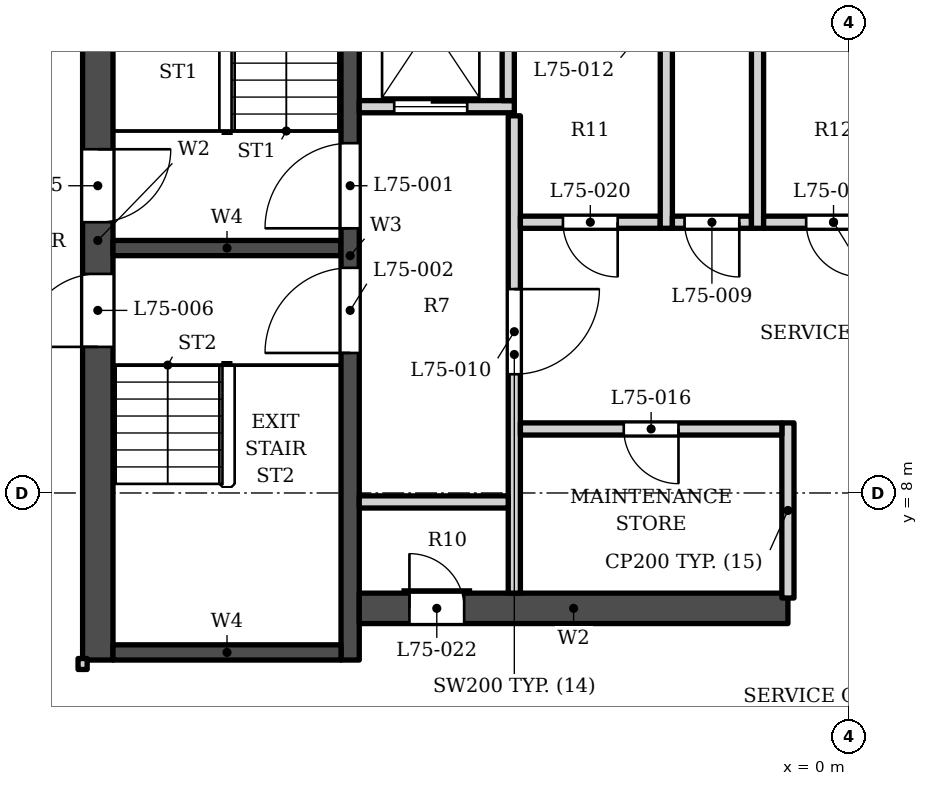
"""IFC4 building model, lengths in metres.
Left out: names, types, materials, properties, quantities, classifications, styles, units other than length and angle.
Written with IfcOpenShell. Run it as: python <this file> out.ifc"""

import sys

from ifc_helpers import new_model, si_unit, direction, frame, frame_2d, origin, place, context, subcontext, project, spatial, rectangle, extrude, element, fill, save


model = new_model("IFC4")
c1 = context("Model", 3, precision=1e-05, world=origin(), true_north=direction((0.0, 1.0)))
c2 = subcontext(c1, "Body", "Model", "MODEL_VIEW")
j1 = project(units=[si_unit("LENGTHUNIT", "METRE"), si_unit("PLANEANGLEUNIT", "RADIAN")], contexts=[c1])
p1 = place(None, origin())
s1 = spatial("IfcSite", under=j1, at=p1, CompositionType="ELEMENT")
p2 = place(p1, origin())
s2 = spatial("IfcBuilding", under=s1, at=p2, CompositionType="ELEMENT")
p3 = place(p2, frame((0.0, 0.0, 320.5)))
s3 = spatial("IfcBuildingStorey", under=s2, at=p3, CompositionType="ELEMENT", Elevation=320.5)
p4 = place(p3, frame((-12.35, 5.253, 0.0), z_axis=(0.0, 0.0, 1.0), x_axis=(0.0, 1.0, 0.0)))
e1 = element("IfcWall", 1, at=p4, inside=s3, PredefinedType="SHEAR", context=c2, shape_type="SweptSolid", body=[
    extrude(rectangle(XDim=13.8, YDim=0.5, at=frame_2d((6.9, 0.0))), origin(), (0.0, 0.0, 1.0), 5.0),
])
p5 = place(p4, frame((7.2, 0.0, 0.0)))
e2 = element("IfcOpeningElement", 2, at=p5, cuts=e1, PredefinedType="OPENING", context=c2, shape_type="SweptSolid", body=[
    extrude(rectangle(XDim=1.2, YDim=2.1, at=frame_2d((0.6, 1.05))), frame((0.0, 0.26, 0.0), z_axis=(0.0, -1.0, 0.0), x_axis=(1.0, 0.0, 0.0)), (0.0, 0.0, 1.0), 0.52),
])
p6 = place(p4, frame((5.15, 0.0, 0.0)))
e3 = element("IfcOpeningElement", 3, at=p6, cuts=e1, PredefinedType="OPENING", context=c2, shape_type="SweptSolid", body=[
    extrude(rectangle(XDim=1.2, YDim=2.1, at=frame_2d((0.6, 1.05))), frame((0.0, 0.26, 0.0), z_axis=(0.0, -1.0, 0.0), x_axis=(1.0, 0.0, 0.0)), (0.0, 0.0, 1.0), 0.52),
])
p7 = place(p3, frame((-8.2, 5.253, 0.0), z_axis=(0.0, 0.0, 1.0), x_axis=(0.0, 1.0, 0.0)))
e4 = element("IfcWall", 4, at=p7, inside=s3, PredefinedType="SHEAR", context=c2, shape_type="SweptSolid", body=[
    extrude(rectangle(XDim=13.3, YDim=0.3, at=frame_2d((6.65, 0.0))), origin(), (0.0, 0.0, 1.0), 5.0),
])
p8 = place(p7, frame((7.1, 0.0, 0.0)))
e5 = element("IfcOpeningElement", 5, at=p8, cuts=e4, PredefinedType="OPENING", context=c2, shape_type="SweptSolid", body=[
    extrude(rectangle(XDim=1.4, YDim=2.1, at=frame_2d((0.7, 1.05))), frame((0.0, 0.16, 0.0), z_axis=(0.0, -1.0, 0.0), x_axis=(1.0, 0.0, 0.0)), (0.0, 0.0, 1.0), 0.32),
])
p9 = place(p7, frame((5.05, 0.0, 0.0)))
e6 = element("IfcOpeningElement", 6, at=p9, cuts=e4, PredefinedType="OPENING", context=c2, shape_type="SweptSolid", body=[
    extrude(rectangle(XDim=1.4, YDim=2.1, at=frame_2d((0.7, 1.05))), frame((0.0, 0.16, 0.0), z_axis=(0.0, -1.0, 0.0), x_axis=(1.0, 0.0, 0.0)), (0.0, 0.0, 1.0), 0.32),
])
for number, where, z_axis, x_axis in (
    (7, (-12.1, 12.028, 0.0), (0.0, 0.0, 1.0), (1.0, 0.0, 0.0)),
    (8, (-12.1, 5.378, 0.0), (0.0, 0.0, 1.0), (1.0, 0.0, 0.0)),
):
    element("IfcWall", number, at=place(p3, frame(where, z_axis=z_axis, x_axis=x_axis)), inside=s3, PredefinedType="SHEAR", context=c2, shape_type="SweptSolid", body=[
        extrude(rectangle(XDim=3.75, YDim=0.25, at=frame_2d((1.875, 0.0))), origin(), (0.0, 0.0, 1.0), 5.0),
    ])
p10 = place(p3, frame((-8.05, 6.103, 0.0), z_axis=(0.0, 0.0, 1.0), x_axis=(1.0, 0.0, 0.0)))
e9 = element("IfcWall", 9, at=p10, inside=s3, PredefinedType="SHEAR", context=c2, shape_type="SweptSolid", body=[
    extrude(rectangle(XDim=7.05, YDim=0.5, at=frame_2d((3.525, 0.0))), origin(), (0.0, 0.0, 1.0), 5.0),
])
p11 = place(p10, frame((0.825, 0.0, 0.0)))
e10 = element("IfcOpeningElement", 10, at=p11, cuts=e9, PredefinedType="OPENING", context=c2, shape_type="SweptSolid", body=[
    extrude(rectangle(XDim=0.9, YDim=2.1, at=frame_2d((0.45, 1.05))), frame((0.0, 0.26, 0.0), z_axis=(0.0, -1.0, 0.0), x_axis=(1.0, 0.0, 0.0)), (0.0, 0.0, 1.0), 0.52),
])
p12 = place(p3, frame((-1.0, 6.273, 0.0), z_axis=(0.0, 0.0, 1.0), x_axis=(0.0, 1.0, 0.0)))
e11 = element("IfcWall", 11, at=p12, inside=s3, PredefinedType="PARTITIONING", context=c2, shape_type="SweptSolid", body=[
    extrude(rectangle(XDim=2.88, YDim=0.2, at=frame_2d((1.44, 0.0))), origin(), (0.0, 0.0, 1.0), 4.8),
])
p13 = place(p3, frame((-5.5, 6.353, 0.0), z_axis=(0.0, 0.0, 1.0), x_axis=(0.0, 1.0, 0.0)))
e12 = element("IfcWall", 12, at=p13, inside=s3, PredefinedType="SOLIDWALL", context=c2, shape_type="SweptSolid", body=[
    extrude(rectangle(XDim=7.85, YDim=0.2, at=frame_2d((3.925, 0.0))), origin(), (0.0, 0.0, 1.0), 4.8),
])
p14 = place(p13, frame((3.6, 0.0, 0.0)))
e13 = element("IfcOpeningElement", 13, at=p14, cuts=e12, PredefinedType="OPENING", context=c2, shape_type="SweptSolid", body=[
    extrude(rectangle(XDim=1.4, YDim=2.1, at=frame_2d((0.7, 1.05))), frame((0.0, 0.11, 0.0), z_axis=(0.0, -1.0, 0.0), x_axis=(1.0, 0.0, 0.0)), (0.0, 0.0, 1.0), 0.22),
])
p15 = place(p3, frame((-8.05, 7.853, 0.0), z_axis=(0.0, 0.0, 1.0), x_axis=(1.0, 0.0, 0.0)))
e14 = element("IfcWall", 14, at=p15, inside=s3, PredefinedType="SOLIDWALL", context=c2, shape_type="SweptSolid", body=[
    extrude(rectangle(XDim=2.45, YDim=0.2, at=frame_2d((1.225, 0.0))), origin(), (0.0, 0.0, 1.0), 4.8),
])
p16 = place(p3, frame((-5.4, 9.052, 0.0), z_axis=(0.0, 0.0, 1.0), x_axis=(1.0, 0.0, 0.0)))
e15 = element("IfcWall", 15, at=p16, inside=s3, PredefinedType="PARTITIONING", context=c2, shape_type="SweptSolid", body=[
    extrude(rectangle(XDim=4.3, YDim=0.2, at=frame_2d((2.15, 0.0))), origin(), (0.0, 0.0, 1.0), 4.8),
])
p17 = place(p16, frame((1.7, 0.0, 0.0)))
e16 = element("IfcOpeningElement", 16, at=p17, cuts=e15, PredefinedType="OPENING", context=c2, shape_type="SweptSolid", body=[
    extrude(rectangle(XDim=0.9, YDim=2.1, at=frame_2d((0.45, 1.05))), frame((0.0, 0.11, 0.0), z_axis=(0.0, -1.0, 0.0), x_axis=(1.0, 0.0, 0.0)), (0.0, 0.0, 1.0), 0.22),
])
p18 = place(p3, frame((-5.4, 12.453, 0.0), z_axis=(0.0, 0.0, 1.0), x_axis=(1.0, 0.0, 0.0)))
e17 = element("IfcWall", 17, at=p18, inside=s3, PredefinedType="PARTITIONING", context=c2, shape_type="SweptSolid", body=[
    extrude(rectangle(XDim=2.3, YDim=0.2, at=frame_2d((1.15, 0.0))), origin(), (0.0, 0.0, 1.0), 4.8),
])
p19 = place(p18, frame((0.7, 0.0, 0.0)))
e18 = element("IfcOpeningElement", 18, at=p19, cuts=e17, PredefinedType="OPENING", context=c2, shape_type="SweptSolid", body=[
    extrude(rectangle(XDim=0.9, YDim=2.1, at=frame_2d((0.45, 1.05))), frame((0.0, 0.11, 0.0), z_axis=(0.0, -1.0, 0.0), x_axis=(1.0, 0.0, 0.0)), (0.0, 0.0, 1.0), 0.22),
])
p20 = place(p3, frame((-3.0, 12.353, 0.0), z_axis=(0.0, 0.0, 1.0), x_axis=(0.0, 1.0, 0.0)))
e19 = element("IfcWall", 19, at=p20, inside=s3, PredefinedType="PARTITIONING", context=c2, shape_type="SweptSolid", body=[
    extrude(rectangle(XDim=6.2, YDim=0.2, at=frame_2d((3.1, 0.0))), origin(), (0.0, 0.0, 1.0), 4.8),
])
p21 = place(p20, frame((3.27, 0.0, 0.0)))
e20 = element("IfcOpeningElement", 20, at=p21, cuts=e19, PredefinedType="OPENING", context=c2, shape_type="SweptSolid", body=[
    extrude(rectangle(XDim=0.9, YDim=2.1, at=frame_2d((0.45, 1.05))), frame((0.0, 0.11, 0.0), z_axis=(0.0, -1.0, 0.0), x_axis=(1.0, 0.0, 0.0)), (0.0, 0.0, 1.0), 0.22),
])
p22 = place(p20, frame((4.82, 0.0, 0.0)))
e21 = element("IfcOpeningElement", 21, at=p22, cuts=e19, PredefinedType="OPENING", context=c2, shape_type="SweptSolid", body=[
    extrude(rectangle(XDim=0.9, YDim=2.1, at=frame_2d((0.45, 1.05))), frame((0.0, 0.11, 0.0), z_axis=(0.0, -1.0, 0.0), x_axis=(1.0, 0.0, 0.0)), (0.0, 0.0, 1.0), 0.22),
])
p23 = place(p3, frame((-2.9, 12.453, 0.0), z_axis=(0.0, 0.0, 1.0), x_axis=(1.0, 0.0, 0.0)))
e22 = element("IfcWall", 22, at=p23, inside=s3, PredefinedType="PARTITIONING", context=c2, shape_type="SweptSolid", body=[
    extrude(rectangle(XDim=1.3, YDim=0.2, at=frame_2d((0.65, 0.0))), origin(), (0.0, 0.0, 1.0), 4.8),
])
p24 = place(p23, frame((0.2, 0.0, 0.0)))
e23 = element("IfcOpeningElement", 23, at=p24, cuts=e22, PredefinedType="OPENING", context=c2, shape_type="SweptSolid", body=[
    extrude(rectangle(XDim=0.9, YDim=2.1, at=frame_2d((0.45, 1.05))), frame((0.0, 0.11, 0.0), z_axis=(0.0, -1.0, 0.0), x_axis=(1.0, 0.0, 0.0)), (0.0, 0.0, 1.0), 0.22),
])
p25 = place(p3, frame((-1.5, 12.353, 0.0), z_axis=(0.0, 0.0, 1.0), x_axis=(0.0, 1.0, 0.0)))
e24 = element("IfcWall", 24, at=p25, inside=s3, PredefinedType="PARTITIONING", context=c2, shape_type="SweptSolid", body=[
    extrude(rectangle(XDim=6.2, YDim=0.2, at=frame_2d((3.1, 0.0))), origin(), (0.0, 0.0, 1.0), 4.8),
])
p26 = place(p25, frame((3.58, 0.0, 0.0)))
e25 = element("IfcOpeningElement", 25, at=p26, cuts=e24, PredefinedType="OPENING", context=c2, shape_type="SweptSolid", body=[
    extrude(rectangle(XDim=0.9, YDim=2.1, at=frame_2d((0.45, 1.05))), frame((0.0, 0.11, 0.0), z_axis=(0.0, -1.0, 0.0), x_axis=(1.0, 0.0, 0.0)), (0.0, 0.0, 1.0), 0.22),
])
p27 = place(p25, frame((5.13, 0.0, 0.0)))
e26 = element("IfcOpeningElement", 26, at=p27, cuts=e24, PredefinedType="OPENING", context=c2, shape_type="SweptSolid", body=[
    extrude(rectangle(XDim=0.9, YDim=2.1, at=frame_2d((0.45, 1.05))), frame((0.0, 0.11, 0.0), z_axis=(0.0, -1.0, 0.0), x_axis=(1.0, 0.0, 0.0)), (0.0, 0.0, 1.0), 0.22),
])
p28 = place(p3, frame((-1.4, 12.453, 0.0), z_axis=(0.0, 0.0, 1.0), x_axis=(1.0, 0.0, 0.0)))
e27 = element("IfcWall", 27, at=p28, inside=s3, PredefinedType="PARTITIONING", context=c2, shape_type="SweptSolid", body=[
    extrude(rectangle(XDim=2.3, YDim=0.2, at=frame_2d((1.15, 0.0))), origin(), (0.0, 0.0, 1.0), 4.8),
])
p29 = place(p28, frame((0.7, 0.0, 0.0)))
e28 = element("IfcOpeningElement", 28, at=p29, cuts=e27, PredefinedType="OPENING", context=c2, shape_type="SweptSolid", body=[
    extrude(rectangle(XDim=0.9, YDim=2.1, at=frame_2d((0.45, 1.05))), frame((0.0, 0.11, 0.0), z_axis=(0.0, -1.0, 0.0), x_axis=(1.0, 0.0, 0.0)), (0.0, 0.0, 1.0), 0.22),
])
p30 = place(p3, frame((-8.05, 14.353, 0.0), z_axis=(0.0, 0.0, 1.0), x_axis=(1.0, 0.0, 0.0)))
e29 = element("IfcWall", 29, at=p30, inside=s3, PredefinedType="SOLIDWALL", context=c2, shape_type="SweptSolid", body=[
    extrude(rectangle(XDim=2.55, YDim=0.2, at=frame_2d((1.275, 0.0))), origin(), (0.0, 0.0, 1.0), 4.8),
])
p31 = place(p30, frame((0.575, 0.0, 0.0)))
e30 = element("IfcOpeningElement", 30, at=p31, cuts=e29, PredefinedType="OPENING", context=c2, shape_type="SweptSolid", body=[
    extrude(rectangle(XDim=1.2, YDim=2.1, at=frame_2d((0.6, 1.05))), frame((0.0, 0.11, 0.0), z_axis=(0.0, -1.0, 0.0), x_axis=(1.0, 0.0, 0.0)), (0.0, 0.0, 1.0), 0.22),
])
p32 = place(p3, frame((-5.6, 14.453, 0.0), z_axis=(0.0, 0.0, 1.0), x_axis=(0.0, 1.0, 0.0)))
e31 = element("IfcWall", 31, at=p32, inside=s3, PredefinedType="SOLIDWALL", context=c2, shape_type="SweptSolid", body=[
    extrude(rectangle(XDim=3.9, YDim=0.2, at=frame_2d((1.95, 0.0))), origin(), (0.0, 0.0, 1.0), 4.8),
])
p33 = place(p3, frame((-12.6, 5.098, 0.0), z_axis=(0.0, 0.0, 1.0), x_axis=(0.0, 1.0, 0.0)))
e32 = element("IfcWall", 32, at=p33, inside=s3, PredefinedType="PARTITIONING", context=c2, shape_type="SweptSolid", body=[
    extrude(rectangle(XDim=0.18, YDim=0.15, at=frame_2d((0.09, 0.0))), origin(), (0.0, 0.0, 1.0), 4.8),
])
p34 = place(p31, origin())
e33 = element("IfcDoor", 33, at=p34, inside=s3, OperationType="DOUBLE_DOOR_SLIDING", PredefinedType="DOOR", context=c2, shape_type="SweptSolid", body=[
    extrude(rectangle(XDim=1.2, YDim=2.1, at=frame_2d((0.6, 1.05))), frame((0.0, 0.025, 0.0), z_axis=(0.0, -1.0, 0.0), x_axis=(1.0, 0.0, 0.0)), (0.0, 0.0, 1.0), 0.05),
])
fill(e30, e33)
p35 = place(p8, origin())
e34 = element("IfcDoor", 34, at=p35, inside=s3, OperationType="SINGLE_SWING_LEFT", PredefinedType="DOOR", context=c2, shape_type="SweptSolid", body=[
    extrude(rectangle(XDim=1.4, YDim=2.1, at=frame_2d((0.7, 1.05))), frame((0.0, 0.025, 0.0), z_axis=(0.0, -1.0, 0.0), x_axis=(1.0, 0.0, 0.0)), (0.0, 0.0, 1.0), 0.05),
])
fill(e5, e34)
p36 = place(p9, origin())
e35 = element("IfcDoor", 35, at=p36, inside=s3, OperationType="SINGLE_SWING_LEFT", PredefinedType="DOOR", context=c2, shape_type="SweptSolid", body=[
    extrude(rectangle(XDim=1.4, YDim=2.1, at=frame_2d((0.7, 1.05))), frame((0.0, 0.025, 0.0), z_axis=(0.0, -1.0, 0.0), x_axis=(1.0, 0.0, 0.0)), (0.0, 0.0, 1.0), 0.05),
])
fill(e6, e35)
p37 = place(p5, origin())
e36 = element("IfcDoor", 36, at=p37, inside=s3, OperationType="SINGLE_SWING_RIGHT", PredefinedType="DOOR", context=c2, shape_type="SweptSolid", body=[
    extrude(rectangle(XDim=1.2, YDim=2.1, at=frame_2d((0.6, 1.05))), frame((0.0, 0.025, 0.0), z_axis=(0.0, -1.0, 0.0), x_axis=(1.0, 0.0, 0.0)), (0.0, 0.0, 1.0), 0.05),
])
fill(e2, e36)
p38 = place(p6, origin())
e37 = element("IfcDoor", 37, at=p38, inside=s3, OperationType="SINGLE_SWING_LEFT", PredefinedType="DOOR", context=c2, shape_type="SweptSolid", body=[
    extrude(rectangle(XDim=1.2, YDim=2.1, at=frame_2d((0.6, 1.05))), frame((0.0, 0.025, 0.0), z_axis=(0.0, -1.0, 0.0), x_axis=(1.0, 0.0, 0.0)), (0.0, 0.0, 1.0), 0.05),
])
fill(e3, e37)
p39 = place(p24, origin())
e38 = element("IfcDoor", 38, at=p39, inside=s3, OperationType="SINGLE_SWING_RIGHT", PredefinedType="DOOR", context=c2, shape_type="SweptSolid", body=[
    extrude(rectangle(XDim=0.9, YDim=2.1, at=frame_2d((0.45, 1.05))), frame((0.0, 0.025, 0.0), z_axis=(0.0, -1.0, 0.0), x_axis=(1.0, 0.0, 0.0)), (0.0, 0.0, 1.0), 0.05),
])
fill(e23, e38)
p40 = place(p14, origin())
e39 = element("IfcDoor", 39, at=p40, inside=s3, OperationType="SINGLE_SWING_RIGHT", PredefinedType="DOOR", context=c2, shape_type="SweptSolid", body=[
    extrude(rectangle(XDim=1.4, YDim=2.1, at=frame_2d((0.7, 1.05))), frame((0.0, 0.025, 0.0), z_axis=(0.0, -1.0, 0.0), x_axis=(1.0, 0.0, 0.0)), (0.0, 0.0, 1.0), 0.05),
])
fill(e13, e39)
p41 = place(p17, origin())
e40 = element("IfcDoor", 40, at=p41, inside=s3, OperationType="SINGLE_SWING_RIGHT", PredefinedType="DOOR", context=c2, shape_type="SweptSolid", body=[
    extrude(rectangle(XDim=0.9, YDim=2.1, at=frame_2d((0.45, 1.05))), frame((0.0, 0.025, 0.0), z_axis=(0.0, -1.0, 0.0), x_axis=(1.0, 0.0, 0.0)), (0.0, 0.0, 1.0), 0.05),
])
fill(e16, e40)
p42 = place(p19, origin())
e41 = element("IfcDoor", 41, at=p42, inside=s3, OperationType="SINGLE_SWING_RIGHT", PredefinedType="DOOR", context=c2, shape_type="SweptSolid", body=[
    extrude(rectangle(XDim=0.9, YDim=2.1, at=frame_2d((0.45, 1.05))), frame((0.0, 0.025, 0.0), z_axis=(0.0, -1.0, 0.0), x_axis=(1.0, 0.0, 0.0)), (0.0, 0.0, 1.0), 0.05),
])
fill(e18, e41)
p43 = place(p29, origin())
e42 = element("IfcDoor", 42, at=p43, inside=s3, OperationType="SINGLE_SWING_RIGHT", PredefinedType="DOOR", context=c2, shape_type="SweptSolid", body=[
    extrude(rectangle(XDim=0.9, YDim=2.1, at=frame_2d((0.45, 1.05))), frame((0.0, 0.025, 0.0), z_axis=(0.0, -1.0, 0.0), x_axis=(1.0, 0.0, 0.0)), (0.0, 0.0, 1.0), 0.05),
])
fill(e28, e42)
p44 = place(p11, origin())
e43 = element("IfcDoor", 43, at=p44, inside=s3, OperationType="SINGLE_SWING_LEFT", PredefinedType="DOOR", context=c2, shape_type="SweptSolid", body=[
    extrude(rectangle(XDim=0.9, YDim=2.1, at=frame_2d((0.45, 1.05))), frame((0.0, 0.025, 0.0), z_axis=(0.0, -1.0, 0.0), x_axis=(1.0, 0.0, 0.0)), (0.0, 0.0, 1.0), 0.05),
])
fill(e10, e43)
save(model, sys.argv[1])
